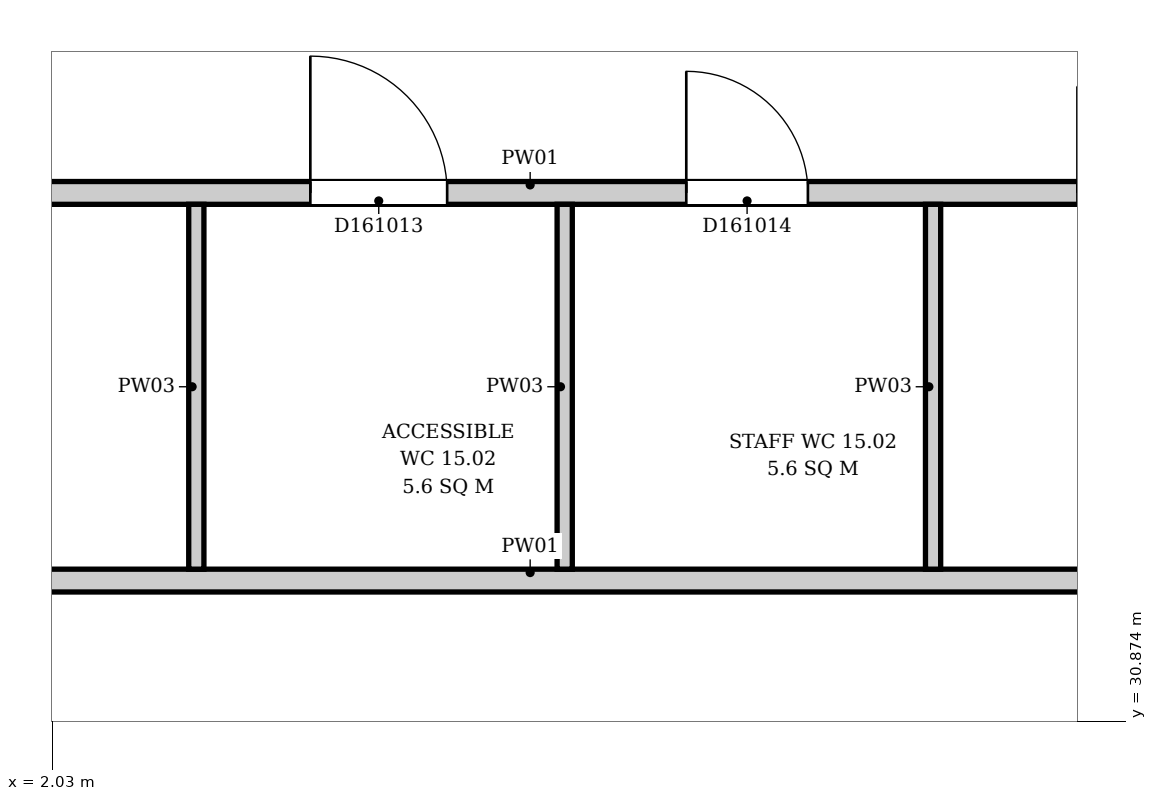
"""IFC4 building model, lengths in metres.
Left out: names, types, materials, properties, quantities, classifications, styles, units other than length and angle.
Written with IfcOpenShell. Run it as: python <this file> out.ifc"""

import sys

from ifc_helpers import new_model, si_unit, direction, frame, frame_2d, origin, place, context, subcontext, project, spatial, rectangle, extrude, element, fill, save


model = new_model("IFC4")
c1 = context("Model", 3, precision=1e-05, world=origin(), true_north=direction((0.0, 1.0)))
c2 = subcontext(c1, "Body", "Model", "MODEL_VIEW")
j1 = project(units=[si_unit("LENGTHUNIT", "METRE"), si_unit("PLANEANGLEUNIT", "RADIAN")], contexts=[c1])
p1 = place(None, origin())
s1 = spatial("IfcSite", under=j1, at=p1, CompositionType="ELEMENT")
p2 = place(p1, origin())
s2 = spatial("IfcBuilding", under=s1, at=p2, CompositionType="ELEMENT")
p3 = place(p2, frame((0.0, 0.0, 73.9)))
s3 = spatial("IfcBuildingStorey", under=s2, at=p3, CompositionType="ELEMENT", Elevation=73.9)
p4 = place(p3, frame((-0.044, 31.8, 0.0), z_axis=(0.0, 0.0, 1.0), x_axis=(1.0, 0.0, 0.0)))
e1 = element("IfcWall", 1, at=p4, inside=s3, PredefinedType="PARTITIONING", context=c2, shape_type="SweptSolid", body=[
    extrude(rectangle(XDim=10.438, YDim=0.15, at=frame_2d((5.219, 0.0))), origin(), (0.0, 0.0, 1.0), 3.9),
])
p5 = place(p3, frame((-0.044, 34.35, 0.0), z_axis=(0.0, 0.0, 1.0), x_axis=(1.0, 0.0, 0.0)))
e2 = element("IfcWall", 2, at=p5, inside=s3, PredefinedType="PARTITIONING", context=c2, shape_type="SweptSolid", body=[
    extrude(rectangle(XDim=10.438, YDim=0.15, at=frame_2d((5.219, 0.0))), origin(), (0.0, 0.0, 1.0), 3.9),
])
p6 = place(p5, frame((1.094, 0.0, 0.0)))
e3 = element("IfcOpeningElement", 3, at=p6, cuts=e2, PredefinedType="OPENING", context=c2, shape_type="SweptSolid", body=[
    extrude(rectangle(XDim=0.8, YDim=2.1, at=frame_2d((0.4, 1.05))), frame((0.0, 0.085, 0.0), z_axis=(0.0, -1.0, 0.0), x_axis=(1.0, 0.0, 0.0)), (0.0, 0.0, 1.0), 0.17),
])
p7 = place(p5, frame((3.773, 0.0, 0.0)))
e4 = element("IfcOpeningElement", 4, at=p7, cuts=e2, PredefinedType="OPENING", context=c2, shape_type="SweptSolid", body=[
    extrude(rectangle(XDim=0.9, YDim=2.1, at=frame_2d((0.45, 1.05))), frame((0.0, 0.085, 0.0), z_axis=(0.0, -1.0, 0.0), x_axis=(1.0, 0.0, 0.0)), (0.0, 0.0, 1.0), 0.17),
])
p8 = place(p5, frame((6.246, 0.0, 0.0)))
e5 = element("IfcOpeningElement", 5, at=p8, cuts=e2, PredefinedType="OPENING", context=c2, shape_type="SweptSolid", body=[
    extrude(rectangle(XDim=0.8, YDim=2.1, at=frame_2d((0.4, 1.05))), frame((0.0, 0.085, 0.0), z_axis=(0.0, -1.0, 0.0), x_axis=(1.0, 0.0, 0.0)), (0.0, 0.0, 1.0), 0.17),
])
p9 = place(p5, frame((8.819, 0.0, 0.0)))
e6 = element("IfcOpeningElement", 6, at=p9, cuts=e2, PredefinedType="OPENING", context=c2, shape_type="SweptSolid", body=[
    extrude(rectangle(XDim=0.7, YDim=2.1, at=frame_2d((0.35, 1.05))), frame((0.0, 0.085, 0.0), z_axis=(0.0, -1.0, 0.0), x_axis=(1.0, 0.0, 0.0)), (0.0, 0.0, 1.0), 0.17),
])
for number, where, z_axis, x_axis in (
    (7, (2.979, 31.875, 0.0), (0.0, 0.0, 1.0), (0.0, 1.0, 0.0)),
    (8, (5.402, 31.875, 0.0), (0.0, 0.0, 1.0), (0.0, 1.0, 0.0)),
    (9, (7.825, 31.875, 0.0), (0.0, 0.0, 1.0), (0.0, 1.0, 0.0)),
):
    element("IfcWall", number, at=place(p3, frame(where, z_axis=z_axis, x_axis=x_axis)), inside=s3, PredefinedType="PARTITIONING", context=c2, shape_type="SweptSolid", body=[
        extrude(rectangle(XDim=2.4, YDim=0.1, at=frame_2d((1.2, 0.0))), origin(), (0.0, 0.0, 1.0), 3.9),
    ])
p10 = place(p7, origin())
e10 = element("IfcDoor", 10, at=p10, inside=s3, OperationType="SINGLE_SWING_LEFT", PredefinedType="DOOR", context=c2, shape_type="SweptSolid", body=[
    extrude(rectangle(XDim=0.9, YDim=2.1, at=frame_2d((0.45, 1.05))), frame((0.0, 0.025, 0.0), z_axis=(0.0, -1.0, 0.0), x_axis=(1.0, 0.0, 0.0)), (0.0, 0.0, 1.0), 0.05),
])
fill(e4, e10)
p11 = place(p8, origin())
e11 = element("IfcDoor", 11, at=p11, inside=s3, OperationType="SINGLE_SWING_LEFT", PredefinedType="DOOR", context=c2, shape_type="SweptSolid", body=[
    extrude(rectangle(XDim=0.8, YDim=2.1, at=frame_2d((0.4, 1.05))), frame((0.0, 0.025, 0.0), z_axis=(0.0, -1.0, 0.0), x_axis=(1.0, 0.0, 0.0)), (0.0, 0.0, 1.0), 0.05),
])
fill(e5, e11)
p12 = place(p9, origin())
e12 = element("IfcDoor", 12, at=p12, inside=s3, OperationType="SINGLE_SWING_LEFT", PredefinedType="DOOR", context=c2, shape_type="SweptSolid", body=[
    extrude(rectangle(XDim=0.7, YDim=2.1, at=frame_2d((0.35, 1.05))), frame((0.0, 0.025, 0.0), z_axis=(0.0, -1.0, 0.0), x_axis=(1.0, 0.0, 0.0)), (0.0, 0.0, 1.0), 0.05),
])
fill(e6, e12)
save(model, sys.argv[1])
